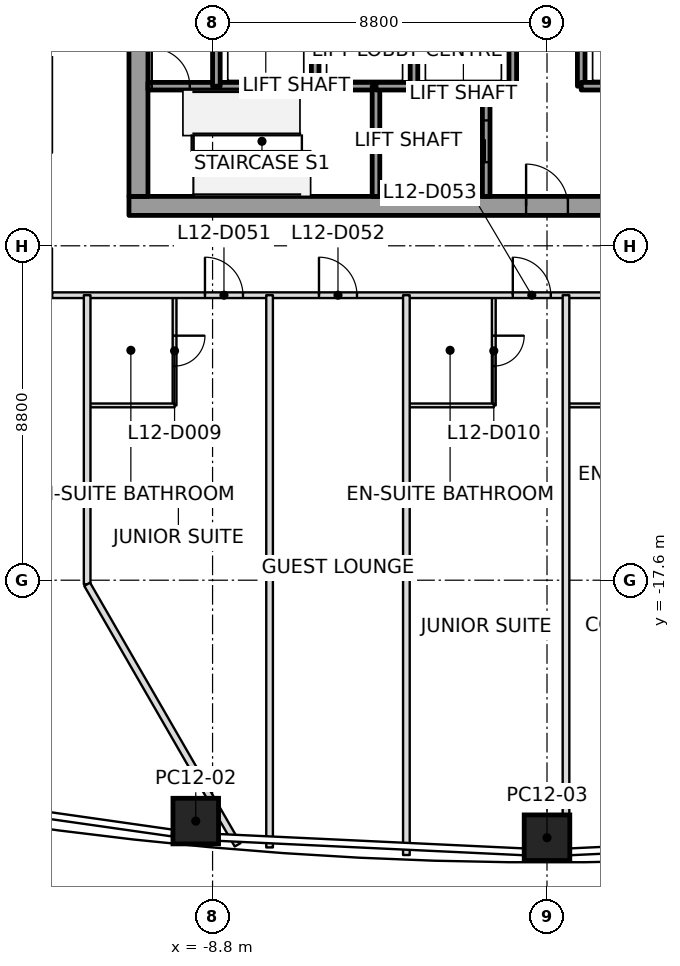
"""IFC4 building model, lengths in metres.
Left out: names, types, materials, properties, quantities, classifications, styles, units other than length and angle.
Written with IfcOpenShell. Run it as: python <this file> out.ifc"""

import sys

from ifc_helpers import new_model, si_unit, direction, frame, frame_2d, origin, origin_2d, place, context, subcontext, project, spatial, rectangle, extrude, clip, halfspace, element, fill, save


model = new_model("IFC4")
c1 = context("Model", 3, precision=1e-05, world=origin(), true_north=direction((0.0, 1.0)))
c2 = subcontext(c1, "Body", "Model", "MODEL_VIEW")
j1 = project(units=[si_unit("LENGTHUNIT", "METRE"), si_unit("PLANEANGLEUNIT", "RADIAN")], contexts=[c1])
p1 = place(None, origin())
s1 = spatial("IfcSite", under=j1, at=p1, CompositionType="ELEMENT")
p2 = place(p1, origin())
s2 = spatial("IfcBuilding", under=s1, at=p2, CompositionType="ELEMENT")
p3 = place(p2, frame((0.0, 0.0, 66.5)))
s3 = spatial("IfcBuildingStorey", under=s2, at=p3, CompositionType="ELEMENT", Elevation=66.5)
p4 = place(p3, frame((-9.242, -23.939, 0.0), z_axis=(0.00942953432, 0.204607977573, 0.978798579584), x_axis=(0.990215317111, -0.138199898552, 0.019349775144)))
e1 = element("IfcColumn", 1, at=p4, inside=s3, PredefinedType="COLUMN", context=c2, shape_type="SweptSolid", body=[
    clip(clip(extrude(rectangle(XDim=1.2, YDim=1.2, at=origin_2d()), origin(), (0.0, 0.0, 1.0), 3.78), halfspace(frame((0.0, 0.0, 0.007)), True)), halfspace(frame((0.0, 0.0, 3.762)), False)),
])
p5 = place(p3, frame((0.0, -24.376, 0.0), z_axis=(0.0, 0.219274740936, 0.975663152931), x_axis=(-1.0, 0.0, 0.0)))
e2 = element("IfcColumn", 2, at=p5, inside=s3, PredefinedType="COLUMN", context=c2, shape_type="SweptSolid", body=[
    clip(clip(extrude(rectangle(XDim=1.2, YDim=1.2, at=origin_2d()), origin(), (0.0, 0.0, 1.0), 3.792), halfspace(frame((0.0, 0.0, 0.006)), True)), halfspace(frame((0.0, 0.0, 3.775)), False)),
])
p6 = place(p3, frame((-11.0, -7.75, 0.0), z_axis=(0.0, 0.0, 1.0), x_axis=(1.0, 0.0, 0.0)))
e3 = element("IfcWall", 3, at=p6, inside=s3, PredefinedType="SHEAR", context=c2, shape_type="SweptSolid", body=[
    extrude(rectangle(XDim=22.0, YDim=0.5, at=frame_2d((11.0, 0.0))), origin(), (0.0, 0.0, 1.0), 3.7),
])
p7 = place(p6, frame((10.45, 0.0, 0.0)))
e4 = element("IfcOpeningElement", 4, at=p7, cuts=e3, PredefinedType="OPENING", context=c2, shape_type="SweptSolid", body=[
    extrude(rectangle(XDim=1.1, YDim=2.1, at=frame_2d((0.55, 1.05))), frame((0.0, 0.25, 0.0), z_axis=(0.0, -1.0, 0.0), x_axis=(1.0, 0.0, 0.0)), (0.0, 0.0, 1.0), 0.5),
])
p8 = place(p3, frame((-10.75, -7.5, 0.0), z_axis=(0.0, 0.0, 1.0), x_axis=(0.0, 1.0, 0.0)))
e5 = element("IfcWall", 5, at=p8, inside=s3, PredefinedType="SHEAR", context=c2, shape_type="SweptSolid", body=[
    extrude(rectangle(XDim=15.0, YDim=0.5, at=frame_2d((7.5, 0.0))), origin(), (0.0, 0.0, 1.0), 3.7),
])
p9 = place(p8, frame((6.6, 0.0, 0.0)))
e6 = element("IfcOpeningElement", 6, at=p9, cuts=e5, PredefinedType="OPENING", context=c2, shape_type="SweptSolid", body=[
    extrude(rectangle(XDim=1.8, YDim=2.1, at=frame_2d((0.9, 1.05))), frame((0.0, 0.25, 0.0), z_axis=(0.0, -1.0, 0.0), x_axis=(1.0, 0.0, 0.0)), (0.0, 0.0, 1.0), 0.5),
])
p10 = place(p3, frame((-10.5, -4.6, 0.0), z_axis=(0.0, 0.0, 1.0), x_axis=(1.0, 0.0, 0.0)))
e7 = element("IfcWall", 7, at=p10, inside=s3, PredefinedType="SOLIDWALL", context=c2, shape_type="SweptSolid", body=[
    extrude(rectangle(XDim=1.8, YDim=0.2, at=frame_2d((0.9, 0.0))), origin(), (0.0, 0.0, 1.0), 3.55),
])
p11 = place(p10, frame((0.1, 0.0, 0.0)))
e8 = element("IfcOpeningElement", 8, at=p11, cuts=e7, PredefinedType="OPENING", context=c2, shape_type="SweptSolid", body=[
    extrude(rectangle(XDim=1.0, YDim=2.1, at=frame_2d((0.5, 1.05))), frame((0.0, 0.1, 0.0), z_axis=(0.0, -1.0, 0.0), x_axis=(1.0, 0.0, 0.0)), (0.0, 0.0, 1.0), 0.2),
])
p12 = place(p3, frame((-8.7, -4.6, 0.0), z_axis=(0.0, 0.0, 1.0), x_axis=(1.0, 0.0, 0.0)))
e9 = element("IfcWall", 9, at=p12, inside=s3, PredefinedType="SOLIDWALL", context=c2, shape_type="SweptSolid", body=[
    extrude(rectangle(XDim=2.6, YDim=0.2, at=frame_2d((1.3, 0.0))), origin(), (0.0, 0.0, 1.0), 3.55),
])
p13 = place(p3, frame((-8.7, -4.6, 0.0), z_axis=(0.0, 0.0, 1.0), x_axis=(0.0, 1.0, 0.0)))
e10 = element("IfcWall", 10, at=p13, inside=s3, PredefinedType="SOLIDWALL", context=c2, shape_type="SweptSolid", body=[
    extrude(rectangle(XDim=2.8, YDim=0.2, at=frame_2d((1.4, 0.0))), origin(), (0.0, 0.0, 1.0), 3.55),
])
p14 = place(p3, frame((-6.1, -4.6, 0.0), z_axis=(0.0, 0.0, 1.0), x_axis=(1.0, 0.0, 0.0)))
e11 = element("IfcWall", 11, at=p14, inside=s3, PredefinedType="SOLIDWALL", context=c2, shape_type="SweptSolid", body=[
    extrude(rectangle(XDim=1.6, YDim=0.2, at=frame_2d((0.8, 0.0))), origin(), (0.0, 0.0, 1.0), 3.55),
])
p15 = place(p3, frame((-6.1, -4.6, 0.0), z_axis=(0.0, 0.0, 1.0), x_axis=(0.0, 1.0, 0.0)))
e12 = element("IfcWall", 12, at=p15, inside=s3, PredefinedType="SOLIDWALL", context=c2, shape_type="SweptSolid", body=[
    extrude(rectangle(XDim=2.8, YDim=0.2, at=frame_2d((1.4, 0.0))), origin(), (0.0, 0.0, 1.0), 3.55),
])
p16 = place(p3, frame((-4.5, -4.6, 0.0), z_axis=(0.0, 0.0, 1.0), x_axis=(0.0, -1.0, 0.0)))
e13 = element("IfcWall", 13, at=p16, inside=s3, PredefinedType="SOLIDWALL", context=c2, shape_type="SweptSolid", body=[
    extrude(rectangle(XDim=2.9, YDim=0.2, at=frame_2d((1.45, 0.0))), origin(), (0.0, 0.0, 1.0), 3.55),
])
p17 = place(p3, frame((-4.5, -4.6, 0.0), z_axis=(0.0, 0.0, 1.0), x_axis=(1.0, 0.0, 0.0)))
e14 = element("IfcWall", 14, at=p17, inside=s3, PredefinedType="SOLIDWALL", context=c2, shape_type="SweptSolid", body=[
    extrude(rectangle(XDim=1.0, YDim=0.2, at=frame_2d((0.5, 0.0))), origin(), (0.0, 0.0, 1.0), 3.55),
])
p18 = place(p3, frame((-3.5, -4.6, 0.0), z_axis=(0.0, 0.0, 1.0), x_axis=(1.0, 0.0, 0.0)))
e15 = element("IfcWall", 15, at=p18, inside=s3, PredefinedType="SOLIDWALL", context=c2, shape_type="SweptSolid", body=[
    extrude(rectangle(XDim=1.9, YDim=0.2, at=frame_2d((0.95, 0.0))), origin(), (0.0, 0.0, 1.0), 3.55),
])
p19 = place(p3, frame((-3.5, -4.6, 0.0), z_axis=(0.0, 0.0, 1.0), x_axis=(0.0, 1.0, 0.0)))
e16 = element("IfcWall", 16, at=p19, inside=s3, PredefinedType="SOLIDWALL", context=c2, shape_type="SweptSolid", body=[
    extrude(rectangle(XDim=2.8, YDim=0.2, at=frame_2d((1.4, 0.0))), origin(), (0.0, 0.0, 1.0), 3.55),
])
p20 = place(p3, frame((-1.6, -7.5, 0.0), z_axis=(0.0, 0.0, 1.0), x_axis=(0.0, 1.0, 0.0)))
e17 = element("IfcWall", 17, at=p20, inside=s3, PredefinedType="SOLIDWALL", context=c2, shape_type="SweptSolid", body=[
    extrude(rectangle(XDim=2.9, YDim=0.2, at=frame_2d((1.45, 0.0))), origin(), (0.0, 0.0, 1.0), 3.55),
])
p21 = place(p20, frame((0.9, 0.0, 0.0)))
e18 = element("IfcOpeningElement", 18, at=p21, cuts=e17, PredefinedType="OPENING", context=c2, shape_type="SweptSolid", body=[
    extrude(rectangle(XDim=1.1, YDim=2.1, at=frame_2d((0.55, 1.05))), frame((0.0, 0.1, 0.0), z_axis=(0.0, -1.0, 0.0), x_axis=(1.0, 0.0, 0.0)), (0.0, 0.0, 1.0), 0.2),
])
p22 = place(p3, frame((-1.6, -4.6, 0.0), z_axis=(0.0, 0.0, 1.0), x_axis=(1.0, 0.0, 0.0)))
e19 = element("IfcWall", 19, at=p22, inside=s3, PredefinedType="SOLIDWALL", context=c2, shape_type="SweptSolid", body=[
    extrude(rectangle(XDim=0.7, YDim=0.2, at=frame_2d((0.35, 0.0))), origin(), (0.0, 0.0, 1.0), 3.55),
])
for number, where, z_axis, x_axis in (
    (20, (-0.9, -4.6, 0.0), (0.0, 0.0, 1.0), (0.0, 1.0, 0.0)),
    (21, (0.9, -1.8, 0.0), (0.0, 0.0, 1.0), (0.0, -1.0, 0.0)),
):
    element("IfcWall", number, at=place(p3, frame(where, z_axis=z_axis, x_axis=x_axis)), inside=s3, PredefinedType="SOLIDWALL", context=c2, shape_type="SweptSolid", body=[
        extrude(rectangle(XDim=2.8, YDim=0.2, at=frame_2d((1.4, 0.0))), origin(), (0.0, 0.0, 1.0), 3.55),
    ])
p23 = place(p3, frame((0.9, -4.6, 0.0), z_axis=(0.0, 0.0, 1.0), x_axis=(1.0, 0.0, 0.0)))
e22 = element("IfcWall", 22, at=p23, inside=s3, PredefinedType="SOLIDWALL", context=c2, shape_type="SweptSolid", body=[
    extrude(rectangle(XDim=0.7, YDim=0.2, at=frame_2d((0.35, 0.0))), origin(), (0.0, 0.0, 1.0), 3.55),
])
p24 = place(p3, frame((-12.1, -10.1, 0.0), z_axis=(0.0, 0.0, 1.0), x_axis=(0.0, -1.0, 0.0)))
e23 = element("IfcWall", 23, at=p24, inside=s3, PredefinedType="PARTITIONING", context=c2, shape_type="SweptSolid", body=[
    extrude(rectangle(XDim=7.608, YDim=0.175, at=frame_2d((3.804, 0.0))), origin(), (0.0, 0.0, 1.0), 3.15),
])
p25 = place(p3, frame((-12.1, -17.708, 0.0), z_axis=(0.0, 0.0, 1.0), x_axis=(0.500006299954, -0.866021766474, 0.0)))
e24 = element("IfcWall", 24, at=p25, inside=s3, PredefinedType="PARTITIONING", context=c2, shape_type="SweptSolid", body=[
    extrude(rectangle(XDim=7.917, YDim=0.175, at=frame_2d((3.958, 0.0))), origin(), (0.0, 0.0, 1.0), 3.15),
])
p26 = place(p3, frame((-7.3, -10.1, 0.0), z_axis=(0.0, 0.0, 1.0), x_axis=(0.0, -1.0, 0.0)))
e25 = element("IfcWall", 25, at=p26, inside=s3, PredefinedType="PARTITIONING", context=c2, shape_type="SweptSolid", body=[
    extrude(rectangle(XDim=14.532, YDim=0.175, at=frame_2d((7.266, 0.0))), origin(), (0.0, 0.0, 1.0), 2.934),
])
p27 = place(p3, frame((-3.7, -24.832, 0.0), z_axis=(0.0, 0.0, 1.0), x_axis=(0.0, 1.0, 0.0)))
e26 = element("IfcWall", 26, at=p27, inside=s3, PredefinedType="PARTITIONING", context=c2, shape_type="SweptSolid", body=[
    extrude(rectangle(XDim=14.732, YDim=0.175, at=frame_2d((7.366, 0.0))), origin(), (0.0, 0.0, 1.0), 2.934),
])
p28 = place(p3, frame((0.5, -10.1, 0.0), z_axis=(0.0, 0.0, 1.0), x_axis=(0.0, -1.0, 0.0)))
e27 = element("IfcWall", 27, at=p28, inside=s3, PredefinedType="PARTITIONING", context=c2, shape_type="SweptSolid", body=[
    extrude(rectangle(XDim=14.801, YDim=0.175, at=frame_2d((7.4, 0.0))), origin(), (0.0, 0.0, 1.0), 2.934),
])
p29 = place(p3, frame((-13.02, -10.1, 0.0), z_axis=(0.0, 0.0, 1.0), x_axis=(1.0, 0.0, 0.0)))
e28 = element("IfcWall", 28, at=p29, inside=s3, PredefinedType="PARTITIONING", context=c2, shape_type="SweptSolid", body=[
    extrude(rectangle(XDim=26.04, YDim=0.15, at=frame_2d((13.02, 0.0))), origin(), (0.0, 0.0, 1.0), 2.947),
])
p30 = place(p29, frame((4.02, 0.0, 0.0)))
e29 = element("IfcOpeningElement", 29, at=p30, cuts=e28, PredefinedType="OPENING", context=c2, shape_type="SweptSolid", body=[
    extrude(rectangle(XDim=1.0, YDim=2.1, at=frame_2d((0.5, 1.05))), frame((0.0, 0.075, 0.0), z_axis=(0.0, -1.0, 0.0), x_axis=(1.0, 0.0, 0.0)), (0.0, 0.0, 1.0), 0.15),
])
p31 = place(p29, frame((7.02, 0.0, 0.0)))
e30 = element("IfcOpeningElement", 30, at=p31, cuts=e28, PredefinedType="OPENING", context=c2, shape_type="SweptSolid", body=[
    extrude(rectangle(XDim=1.0, YDim=2.1, at=frame_2d((0.5, 1.05))), frame((0.0, 0.075, 0.0), z_axis=(0.0, -1.0, 0.0), x_axis=(1.0, 0.0, 0.0)), (0.0, 0.0, 1.0), 0.15),
])
p32 = place(p29, frame((12.12, 0.0, 0.0)))
e31 = element("IfcOpeningElement", 31, at=p32, cuts=e28, PredefinedType="OPENING", context=c2, shape_type="SweptSolid", body=[
    extrude(rectangle(XDim=1.0, YDim=2.1, at=frame_2d((0.5, 1.05))), frame((0.0, 0.075, 0.0), z_axis=(0.0, -1.0, 0.0), x_axis=(1.0, 0.0, 0.0)), (0.0, 0.0, 1.0), 0.15),
])
p33 = place(p29, frame((16.62, 0.0, 0.0)))
e32 = element("IfcOpeningElement", 32, at=p33, cuts=e28, PredefinedType="OPENING", context=c2, shape_type="SweptSolid", body=[
    extrude(rectangle(XDim=1.0, YDim=2.1, at=frame_2d((0.5, 1.05))), frame((0.0, 0.075, 0.0), z_axis=(0.0, -1.0, 0.0), x_axis=(1.0, 0.0, 0.0)), (0.0, 0.0, 1.0), 0.15),
])
p34 = place(p29, frame((19.62, 0.0, 0.0)))
e33 = element("IfcOpeningElement", 33, at=p34, cuts=e28, PredefinedType="OPENING", context=c2, shape_type="SweptSolid", body=[
    extrude(rectangle(XDim=1.0, YDim=2.1, at=frame_2d((0.5, 1.05))), frame((0.0, 0.075, 0.0), z_axis=(0.0, -1.0, 0.0), x_axis=(1.0, 0.0, 0.0)), (0.0, 0.0, 1.0), 0.15),
])
p35 = place(p3, frame((-9.8, -10.13, 0.0), z_axis=(0.0, 0.0, 1.0), x_axis=(0.0, -1.0, 0.0)))
e34 = element("IfcWall", 34, at=p35, inside=s3, PredefinedType="PARTITIONING", context=c2, shape_type="SweptSolid", body=[
    extrude(rectangle(XDim=2.87, YDim=0.1, at=frame_2d((1.435, 0.0))), origin(), (0.0, 0.0, 1.0), 3.15),
])
p36 = place(p35, frame((1.035, 0.0, 0.0)))
e35 = element("IfcOpeningElement", 35, at=p36, cuts=e34, PredefinedType="OPENING", context=c2, shape_type="SweptSolid", body=[
    extrude(rectangle(XDim=0.8, YDim=2.1, at=frame_2d((0.4, 1.05))), frame((0.0, 0.05, 0.0), z_axis=(0.0, -1.0, 0.0), x_axis=(1.0, 0.0, 0.0)), (0.0, 0.0, 1.0), 0.1),
])
p37 = place(p3, frame((-9.8, -13.0, 0.0), z_axis=(0.0, 0.0, 1.0), x_axis=(-1.0, 0.0, 0.0)))
e36 = element("IfcWall", 36, at=p37, inside=s3, PredefinedType="PARTITIONING", context=c2, shape_type="SweptSolid", body=[
    extrude(rectangle(XDim=2.27, YDim=0.1, at=frame_2d((1.135, 0.0))), origin(), (0.0, 0.0, 1.0), 3.15),
])
p38 = place(p3, frame((-1.4, -10.13, 0.0), z_axis=(0.0, 0.0, 1.0), x_axis=(0.0, -1.0, 0.0)))
e37 = element("IfcWall", 37, at=p38, inside=s3, PredefinedType="PARTITIONING", context=c2, shape_type="SweptSolid", body=[
    extrude(rectangle(XDim=2.87, YDim=0.1, at=frame_2d((1.435, 0.0))), origin(), (0.0, 0.0, 1.0), 3.15),
])
p39 = place(p38, frame((1.035, 0.0, 0.0)))
e38 = element("IfcOpeningElement", 38, at=p39, cuts=e37, PredefinedType="OPENING", context=c2, shape_type="SweptSolid", body=[
    extrude(rectangle(XDim=0.8, YDim=2.1, at=frame_2d((0.4, 1.05))), frame((0.0, 0.05, 0.0), z_axis=(0.0, -1.0, 0.0), x_axis=(1.0, 0.0, 0.0)), (0.0, 0.0, 1.0), 0.1),
])
p40 = place(p3, frame((-1.4, -13.0, 0.0), z_axis=(0.0, 0.0, 1.0), x_axis=(-1.0, 0.0, 0.0)))
e39 = element("IfcWall", 39, at=p40, inside=s3, PredefinedType="PARTITIONING", context=c2, shape_type="SweptSolid", body=[
    extrude(rectangle(XDim=2.27, YDim=0.1, at=frame_2d((1.135, 0.0))), origin(), (0.0, 0.0, 1.0), 2.947),
])
p41 = place(p3, frame((2.8, -13.0, 0.0), z_axis=(0.0, 0.0, 1.0), x_axis=(-1.0, 0.0, 0.0)))
e40 = element("IfcWall", 40, at=p41, inside=s3, PredefinedType="PARTITIONING", context=c2, shape_type="SweptSolid", body=[
    extrude(rectangle(XDim=2.27, YDim=0.1, at=frame_2d((1.135, 0.0))), origin(), (0.0, 0.0, 1.0), 3.15),
])
p42 = place(p30, origin())
e41 = element("IfcDoor", 41, at=p42, inside=s3, OperationType="SINGLE_SWING_LEFT", PredefinedType="DOOR", context=c2, shape_type="SweptSolid", body=[
    extrude(rectangle(XDim=1.0, YDim=2.1, at=frame_2d((0.5, 1.05))), frame((0.0, 0.025, 0.0), z_axis=(0.0, -1.0, 0.0), x_axis=(1.0, 0.0, 0.0)), (0.0, 0.0, 1.0), 0.05),
])
fill(e29, e41)
p43 = place(p36, origin())
e42 = element("IfcDoor", 42, at=p43, inside=s3, OperationType="SINGLE_SWING_LEFT", PredefinedType="DOOR", context=c2, shape_type="SweptSolid", body=[
    extrude(rectangle(XDim=0.8, YDim=2.1, at=frame_2d((0.4, 1.05))), frame((0.0, 0.025, 0.0), z_axis=(0.0, -1.0, 0.0), x_axis=(1.0, 0.0, 0.0)), (0.0, 0.0, 1.0), 0.05),
])
fill(e35, e42)
p44 = place(p31, origin())
e43 = element("IfcDoor", 43, at=p44, inside=s3, OperationType="SINGLE_SWING_RIGHT", PredefinedType="DOOR", context=c2, shape_type="SweptSolid", body=[
    extrude(rectangle(XDim=1.0, YDim=2.1, at=frame_2d((0.5, 1.05))), frame((0.0, 0.025, 0.0), z_axis=(0.0, -1.0, 0.0), x_axis=(1.0, 0.0, 0.0)), (0.0, 0.0, 1.0), 0.05),
])
fill(e30, e43)
p45 = place(p32, origin())
e44 = element("IfcDoor", 44, at=p45, inside=s3, OperationType="SINGLE_SWING_LEFT", PredefinedType="DOOR", context=c2, shape_type="SweptSolid", body=[
    extrude(rectangle(XDim=1.0, YDim=2.1, at=frame_2d((0.5, 1.05))), frame((0.0, 0.025, 0.0), z_axis=(0.0, -1.0, 0.0), x_axis=(1.0, 0.0, 0.0)), (0.0, 0.0, 1.0), 0.05),
])
fill(e31, e44)
p46 = place(p39, origin())
e45 = element("IfcDoor", 45, at=p46, inside=s3, OperationType="SINGLE_SWING_LEFT", PredefinedType="DOOR", context=c2, shape_type="SweptSolid", body=[
    extrude(rectangle(XDim=0.8, YDim=2.1, at=frame_2d((0.4, 1.05))), frame((0.0, 0.025, 0.0), z_axis=(0.0, -1.0, 0.0), x_axis=(1.0, 0.0, 0.0)), (0.0, 0.0, 1.0), 0.05),
])
fill(e38, e45)
p47 = place(p21, origin())
e46 = element("IfcDoor", 46, at=p47, inside=s3, OperationType="SLIDING_TO_RIGHT", PredefinedType="DOOR", context=c2, shape_type="SweptSolid", body=[
    extrude(rectangle(XDim=1.1, YDim=2.1, at=frame_2d((0.55, 1.05))), frame((0.0, 0.025, 0.0), z_axis=(0.0, -1.0, 0.0), x_axis=(1.0, 0.0, 0.0)), (0.0, 0.0, 1.0), 0.05),
])
fill(e18, e46)
p48 = place(p11, origin())
e47 = element("IfcDoor", 47, at=p48, inside=s3, OperationType="SINGLE_SWING_LEFT", PredefinedType="DOOR", context=c2, shape_type="SweptSolid", body=[
    extrude(rectangle(XDim=1.0, YDim=2.1, at=frame_2d((0.5, 1.05))), frame((0.0, 0.025, 0.0), z_axis=(0.0, -1.0, 0.0), x_axis=(1.0, 0.0, 0.0)), (0.0, 0.0, 1.0), 0.05),
])
fill(e8, e47)
p49 = place(p7, origin())
e48 = element("IfcDoor", 48, at=p49, inside=s3, OperationType="SINGLE_SWING_LEFT", PredefinedType="DOOR", context=c2, shape_type="SweptSolid", body=[
    extrude(rectangle(XDim=1.1, YDim=2.1, at=frame_2d((0.55, 1.05))), frame((0.0, 0.025, 0.0), z_axis=(0.0, -1.0, 0.0), x_axis=(1.0, 0.0, 0.0)), (0.0, 0.0, 1.0), 0.05),
])
fill(e4, e48)
save(model, sys.argv[1])
